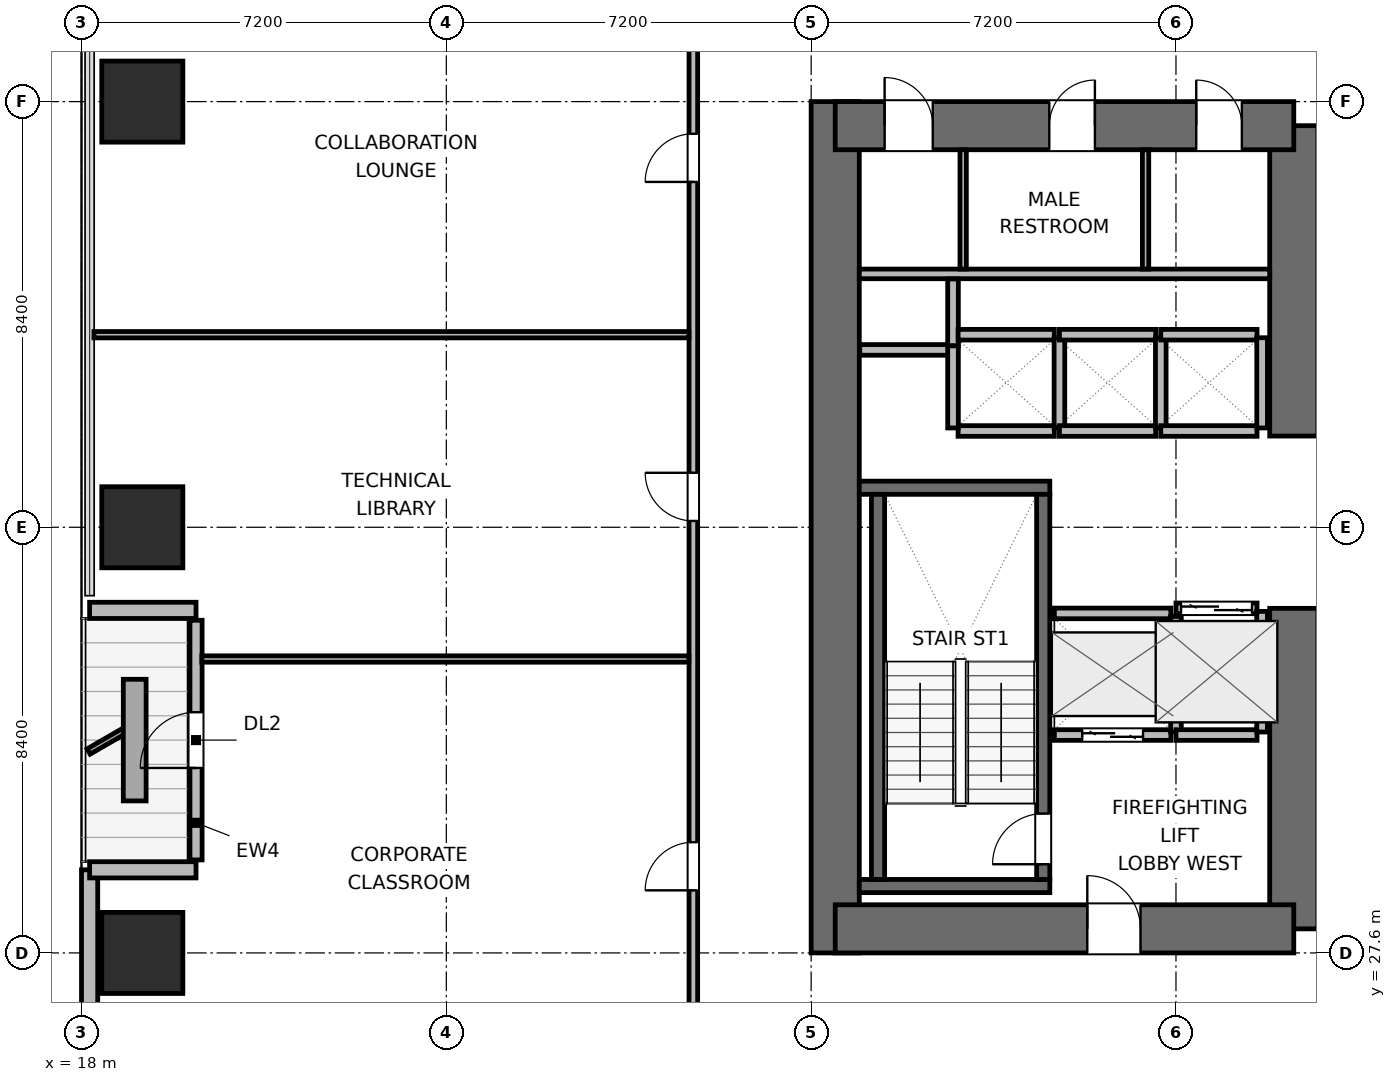
"""IFC4 building model, lengths in metres.
Left out: names, types, materials, properties, quantities, classifications, styles, units other than length and angle.
Written with IfcOpenShell. Run it as: python <this file> out.ifc"""

import sys

from ifc_helpers import new_model, si_unit, direction, frame, frame_2d, origin, origin_2d, place, context, subcontext, project, spatial, rectangle, extrude, element, fill, save


model = new_model("IFC4")
c1 = context("Model", 3, precision=1e-05, world=origin(), true_north=direction((0.0, 1.0)))
c2 = subcontext(c1, "Body", "Model", "MODEL_VIEW")
j1 = project(units=[si_unit("LENGTHUNIT", "METRE"), si_unit("PLANEANGLEUNIT", "RADIAN")], contexts=[c1])
p1 = place(None, origin())
s1 = spatial("IfcSite", under=j1, at=p1, CompositionType="ELEMENT")
p2 = place(p1, origin())
s2 = spatial("IfcBuilding", under=s1, at=p2, CompositionType="ELEMENT")
p3 = place(p2, frame((0.0, 0.0, 41.1)))
s3 = spatial("IfcBuildingStorey", under=s2, at=p3, CompositionType="ELEMENT", Elevation=41.1)
p4 = place(p3, frame((32.875, 27.6, 0.0), z_axis=(0.0, 0.0, 1.0), x_axis=(0.0, 1.0, 0.0)))
e1 = element("IfcWall", 1, at=p4, inside=s3, PredefinedType="SHEAR", context=c2, shape_type="SweptSolid", body=[
    extrude(rectangle(XDim=16.8, YDim=0.95, at=frame_2d((8.4, 0.0))), origin(), (0.0, 0.0, 1.0), 3.9),
])
p5 = place(p3, frame((41.925, 28.075, 0.0), z_axis=(0.0, 0.0, 1.0), x_axis=(0.0, 1.0, 0.0)))
e2 = element("IfcWall", 2, at=p5, inside=s3, PredefinedType="SHEAR", context=c2, shape_type="SweptSolid", body=[
    extrude(rectangle(XDim=6.325, YDim=0.95, at=frame_2d((3.163, 0.0))), origin(), (0.0, 0.0, 1.0), 3.9),
])
p6 = place(p3, frame((41.925, 37.8, 0.0), z_axis=(0.0, 0.0, 1.0), x_axis=(0.0, 1.0, 0.0)))
e3 = element("IfcWall", 3, at=p6, inside=s3, PredefinedType="SHEAR", context=c2, shape_type="SweptSolid", body=[
    extrude(rectangle(XDim=6.125, YDim=0.95, at=frame_2d((3.062, 0.0))), origin(), (0.0, 0.0, 1.0), 3.9),
])
p7 = place(p3, frame((32.875, 28.075, 0.0), z_axis=(0.0, 0.0, 1.0), x_axis=(1.0, 0.0, 0.0)))
e4 = element("IfcWall", 4, at=p7, inside=s3, PredefinedType="SHEAR", context=c2, shape_type="SweptSolid", body=[
    extrude(rectangle(XDim=9.05, YDim=0.95, at=frame_2d((4.525, 0.0))), origin(), (0.0, 0.0, 1.0), 3.9),
])
p8 = place(p7, frame((4.975, 0.0, 0.0)))
e5 = element("IfcOpeningElement", 5, at=p8, cuts=e4, PredefinedType="OPENING", context=c2, shape_type="SweptSolid", body=[
    extrude(rectangle(XDim=1.05, YDim=2.04, at=frame_2d((0.525, 1.02))), frame((0.0, 0.485, 0.0), z_axis=(0.0, -1.0, 0.0), x_axis=(1.0, 0.0, 0.0)), (0.0, 0.0, 1.0), 0.97),
])
p9 = place(p3, frame((32.875, 43.925, 0.0), z_axis=(0.0, 0.0, 1.0), x_axis=(1.0, 0.0, 0.0)))
e6 = element("IfcWall", 6, at=p9, inside=s3, PredefinedType="SHEAR", context=c2, shape_type="SweptSolid", body=[
    extrude(rectangle(XDim=9.05, YDim=0.95, at=frame_2d((4.525, 0.0))), origin(), (0.0, 0.0, 1.0), 3.9),
])
p10 = place(p9, frame((0.975, 0.0, 0.0)))
e7 = element("IfcOpeningElement", 7, at=p10, cuts=e6, PredefinedType="OPENING", context=c2, shape_type="SweptSolid", body=[
    extrude(rectangle(XDim=0.95, YDim=2.04, at=frame_2d((0.475, 1.02))), frame((0.0, 0.485, 0.0), z_axis=(0.0, -1.0, 0.0), x_axis=(1.0, 0.0, 0.0)), (0.0, 0.0, 1.0), 0.97),
])
p11 = place(p9, frame((4.225, 0.0, 0.0)))
e8 = element("IfcOpeningElement", 8, at=p11, cuts=e6, PredefinedType="OPENING", context=c2, shape_type="SweptSolid", body=[
    extrude(rectangle(XDim=0.9, YDim=2.02, at=frame_2d((0.45, 1.01))), frame((0.0, 0.485, 0.0), z_axis=(0.0, -1.0, 0.0), x_axis=(1.0, 0.0, 0.0)), (0.0, 0.0, 1.0), 0.97),
])
p12 = place(p9, frame((7.125, 0.0, 0.0)))
e9 = element("IfcOpeningElement", 9, at=p12, cuts=e6, PredefinedType="OPENING", context=c2, shape_type="SweptSolid", body=[
    extrude(rectangle(XDim=0.9, YDim=2.02, at=frame_2d((0.45, 1.01))), frame((0.0, 0.485, 0.0), z_axis=(0.0, -1.0, 0.0), x_axis=(1.0, 0.0, 0.0)), (0.0, 0.0, 1.0), 0.97),
])
for number, where, z_axis, x_axis in (
    (10, (33.35, 28.92, 0.0), (0.0, 0.0, 1.0), (1.0, 0.0, 0.0)),
    (11, (33.35, 36.78, 0.0), (0.0, 0.0, 1.0), (1.0, 0.0, 0.0)),
):
    element("IfcWall", number, at=place(p3, frame(where, z_axis=z_axis, x_axis=x_axis)), inside=s3, PredefinedType="SHEAR", context=c2, shape_type="SweptSolid", body=[
        extrude(rectangle(XDim=3.76, YDim=0.26, at=frame_2d((1.88, 0.0))), origin(), (0.0, 0.0, 1.0), 3.9),
    ])
p13 = place(p3, frame((33.72, 29.05, 0.0), z_axis=(0.0, 0.0, 1.0), x_axis=(0.0, 1.0, 0.0)))
e12 = element("IfcWall", 12, at=p13, inside=s3, PredefinedType="SHEAR", context=c2, shape_type="SweptSolid", body=[
    extrude(rectangle(XDim=7.6, YDim=0.26, at=frame_2d((3.8, 0.0))), origin(), (0.0, 0.0, 1.0), 3.9),
])
p14 = place(p3, frame((36.98, 29.05, 0.0), z_axis=(0.0, 0.0, 1.0), x_axis=(0.0, 1.0, 0.0)))
e13 = element("IfcWall", 13, at=p14, inside=s3, PredefinedType="SHEAR", context=c2, shape_type="SweptSolid", body=[
    extrude(rectangle(XDim=7.6, YDim=0.26, at=frame_2d((3.8, 0.0))), origin(), (0.0, 0.0, 1.0), 3.9),
])
p15 = place(p14, frame((0.3, 0.0, 0.0)))
e14 = element("IfcOpeningElement", 14, at=p15, cuts=e13, PredefinedType="OPENING", context=c2, shape_type="SweptSolid", body=[
    extrude(rectangle(XDim=1.0, YDim=2.04, at=frame_2d((0.5, 1.02))), frame((0.0, 0.14, 0.0), z_axis=(0.0, -1.0, 0.0), x_axis=(1.0, 0.0, 0.0)), (0.0, 0.0, 1.0), 0.28),
])
for number, where, z_axis, x_axis in (
    (15, (19.2, 27.6, 0.0), (0.0, 0.0, 1.0), (1.0, 0.0, 0.0)),
    (16, (19.2, 36.0, 0.0), (0.0, 0.0, 1.0), (1.0, 0.0, 0.0)),
    (17, (19.2, 44.4, 0.0), (0.0, 0.0, 1.0), (1.0, 0.0, 0.0)),
):
    element("IfcColumn", number, at=place(p3, frame(where, z_axis=z_axis, x_axis=x_axis)), inside=s3, PredefinedType="COLUMN", context=c2, shape_type="SweptSolid", body=[
        extrude(rectangle(XDim=1.6, YDim=1.6, at=origin_2d()), origin(), (0.0, 0.0, 1.0), 3.9),
    ])
p16 = place(p3, frame((18.16, 15.021, 0.0), z_axis=(0.0, 0.0, 1.0), x_axis=(0.0, 1.0, 0.0)))
e18 = element("IfcWall", 18, at=p16, inside=s3, PredefinedType="SOLIDWALL", context=c2, shape_type="SweptSolid", body=[
    extrude(rectangle(XDim=14.219, YDim=0.32, at=frame_2d((7.109, 0.0))), origin(), (0.0, 0.0, 1.0), 3.64),
])
p17 = place(p3, frame((18.16, 29.24, 0.0), z_axis=(0.0, 0.0, 1.0), x_axis=(1.0, 0.0, 0.0)))
e19 = element("IfcWall", 19, at=p17, inside=s3, PredefinedType="SOLIDWALL", context=c2, shape_type="SweptSolid", body=[
    extrude(rectangle(XDim=2.1, YDim=0.32, at=frame_2d((1.05, 0.0))), origin(), (0.0, 0.0, 1.0), 2.875),
])
p18 = place(p3, frame((20.26, 29.435, 0.0), z_axis=(0.0, 0.0, 1.0), x_axis=(0.0, 1.0, 0.0)))
e20 = element("IfcWall", 20, at=p18, inside=s3, PredefinedType="SOLIDWALL", context=c2, shape_type="SweptSolid", body=[
    extrude(rectangle(XDim=4.73, YDim=0.24, at=frame_2d((2.365, 0.0))), origin(), (0.0, 0.0, 1.0), 3.162),
])
p19 = place(p18, frame((1.815, 0.0, 0.0)))
e21 = element("IfcOpeningElement", 21, at=p19, cuts=e20, PredefinedType="OPENING", context=c2, shape_type="SweptSolid", body=[
    extrude(rectangle(XDim=1.1, YDim=2.04, at=frame_2d((0.55, 1.02))), frame((0.0, 0.13, 0.0), z_axis=(0.0, -1.0, 0.0), x_axis=(1.0, 0.0, 0.0)), (0.0, 0.0, 1.0), 0.26),
])
p20 = place(p3, frame((20.26, 34.36, 0.0), z_axis=(0.0, 0.0, 1.0), x_axis=(-1.0, 0.0, 0.0)))
e22 = element("IfcWall", 22, at=p20, inside=s3, PredefinedType="SOLIDWALL", context=c2, shape_type="SweptSolid", body=[
    extrude(rectangle(XDim=2.1, YDim=0.32, at=frame_2d((1.05, 0.0))), origin(), (0.0, 0.0, 1.0), 2.875),
])
p21 = place(p3, frame((33.35, 41.0, 0.0), z_axis=(0.0, 0.0, 1.0), x_axis=(1.0, 0.0, 0.0)))
e23 = element("IfcWall", 23, at=p21, inside=s3, PredefinedType="PLUMBINGWALL", context=c2, shape_type="SweptSolid", body=[
    extrude(rectangle(XDim=8.1, YDim=0.19, at=frame_2d((4.05, 0.0))), origin(), (0.0, 0.0, 1.0), 3.64),
])
for number, where, z_axis, x_axis in (
    (24, (35.4, 41.095, 0.0), (0.0, 0.0, 1.0), (0.0, 1.0, 0.0)),
    (25, (39.0, 41.095, 0.0), (0.0, 0.0, 1.0), (0.0, 1.0, 0.0)),
):
    element("IfcWall", number, at=place(p3, frame(where, z_axis=z_axis, x_axis=x_axis)), inside=s3, PredefinedType="PARTITIONING", context=c2, shape_type="SweptSolid", body=[
        extrude(rectangle(XDim=2.355, YDim=0.125, at=frame_2d((1.177, 0.0))), origin(), (0.0, 0.0, 1.0), 3.64),
    ])
p22 = place(p3, frame((33.36, 39.5, 0.0), z_axis=(0.0, 0.0, 1.0), x_axis=(1.0, 0.0, 0.0)))
e26 = element("IfcWall", 26, at=p22, inside=s3, PredefinedType="PARTITIONING", context=c2, shape_type="SweptSolid", body=[
    extrude(rectangle(XDim=1.86, YDim=0.21, at=frame_2d((0.93, 0.0))), origin(), (0.0, 0.0, 1.0), 3.64),
])
p23 = place(p3, frame((35.2, 39.58, 0.0), z_axis=(0.0, 0.0, 1.0), x_axis=(0.0, 1.0, 0.0)))
e27 = element("IfcWall", 27, at=p23, inside=s3, PredefinedType="PARTITIONING", context=c2, shape_type="SweptSolid", body=[
    extrude(rectangle(XDim=1.32, YDim=0.21, at=frame_2d((0.66, 0.0))), origin(), (0.0, 0.0, 1.0), 3.64),
])
p24 = place(p3, frame((37.2, 31.9, 0.0), z_axis=(0.0, 0.0, 1.0), x_axis=(1.0, 0.0, 0.0)))
e28 = element("IfcWall", 28, at=p24, inside=s3, PredefinedType="PARTITIONING", context=c2, shape_type="SweptSolid", body=[
    extrude(rectangle(XDim=2.3, YDim=0.21, at=frame_2d((1.15, 0.0))), origin(), (0.0, 0.0, 1.0), 3.64),
])
p25 = place(p24, frame((0.55, 0.0, 0.0)))
e29 = element("IfcOpeningElement", 29, at=p25, cuts=e28, PredefinedType="OPENING", context=c2, shape_type="SweptSolid", body=[
    extrude(rectangle(XDim=1.2, YDim=2.04, at=frame_2d((0.6, 1.02))), frame((0.0, 0.115, 0.0), z_axis=(0.0, -1.0, 0.0), x_axis=(1.0, 0.0, 0.0)), (0.0, 0.0, 1.0), 0.23),
])
p26 = place(p3, frame((37.2, 34.3, 0.0), z_axis=(0.0, 0.0, 1.0), x_axis=(1.0, 0.0, 0.0)))
e30 = element("IfcWall", 30, at=p26, inside=s3, PredefinedType="PARTITIONING", context=c2, shape_type="SweptSolid", body=[
    extrude(rectangle(XDim=2.3, YDim=0.21, at=frame_2d((1.15, 0.0))), origin(), (0.0, 0.0, 1.0), 3.64),
])
p27 = place(p3, frame((39.6, 31.96, 0.0), z_axis=(0.0, 0.0, 1.0), x_axis=(0.0, 1.0, 0.0)))
e31 = element("IfcWall", 31, at=p27, inside=s3, PredefinedType="PARTITIONING", context=c2, shape_type="SweptSolid", body=[
    extrude(rectangle(XDim=2.28, YDim=0.21, at=frame_2d((1.14, 0.0))), origin(), (0.0, 0.0, 1.0), 3.64),
])
p28 = place(p3, frame((39.6, 34.4, 0.0), z_axis=(0.0, 0.0, 1.0), x_axis=(1.0, 0.0, 0.0)))
e32 = element("IfcWall", 32, at=p28, inside=s3, PredefinedType="PARTITIONING", context=c2, shape_type="SweptSolid", body=[
    extrude(rectangle(XDim=1.6, YDim=0.21, at=frame_2d((0.8, 0.0))), origin(), (0.0, 0.0, 1.0), 3.64),
])
p29 = place(p28, frame((0.1, 0.0, 0.0)))
e33 = element("IfcOpeningElement", 33, at=p29, cuts=e32, PredefinedType="OPENING", context=c2, shape_type="SweptSolid", body=[
    extrude(rectangle(XDim=1.4, YDim=2.06, at=frame_2d((0.7, 1.03))), frame((0.0, 0.115, 0.0), z_axis=(0.0, -1.0, 0.0), x_axis=(1.0, 0.0, 0.0)), (0.0, 0.0, 1.0), 0.23),
])
p30 = place(p3, frame((39.6, 31.9, 0.0), z_axis=(0.0, 0.0, 1.0), x_axis=(1.0, 0.0, 0.0)))
e34 = element("IfcWall", 34, at=p30, inside=s3, PredefinedType="PARTITIONING", context=c2, shape_type="SweptSolid", body=[
    extrude(rectangle(XDim=1.6, YDim=0.21, at=frame_2d((0.8, 0.0))), origin(), (0.0, 0.0, 1.0), 3.64),
])
p31 = place(p3, frame((41.3, 31.96, 0.0), z_axis=(0.0, 0.0, 1.0), x_axis=(0.0, 1.0, 0.0)))
e35 = element("IfcWall", 35, at=p31, inside=s3, PredefinedType="PARTITIONING", context=c2, shape_type="SweptSolid", body=[
    extrude(rectangle(XDim=2.38, YDim=0.21, at=frame_2d((1.19, 0.0))), origin(), (0.0, 0.0, 1.0), 3.64),
])
for number, where, z_axis, x_axis in (
    (36, (35.3, 37.9, 0.0), (0.0, 0.0, 1.0), (1.0, 0.0, 0.0)),
    (37, (35.3, 39.8, 0.0), (0.0, 0.0, 1.0), (1.0, 0.0, 0.0)),
):
    element("IfcWall", number, at=place(p3, frame(where, z_axis=z_axis, x_axis=x_axis)), inside=s3, PredefinedType="PARTITIONING", context=c2, shape_type="SweptSolid", body=[
        extrude(rectangle(XDim=1.9, YDim=0.21, at=frame_2d((0.95, 0.0))), origin(), (0.0, 0.0, 1.0), 3.64),
    ])
p32 = place(p3, frame((35.2, 37.96, 0.0), z_axis=(0.0, 0.0, 1.0), x_axis=(0.0, 1.0, 0.0)))
e38 = element("IfcWall", 38, at=p32, inside=s3, PredefinedType="PARTITIONING", context=c2, shape_type="SweptSolid", body=[
    extrude(rectangle(XDim=1.62, YDim=0.21, at=frame_2d((0.81, 0.0))), origin(), (0.0, 0.0, 1.0), 3.64),
])
p33 = place(p3, frame((37.3, 37.96, 0.0), z_axis=(0.0, 0.0, 1.0), x_axis=(0.0, 1.0, 0.0)))
e39 = element("IfcWall", 39, at=p33, inside=s3, PredefinedType="PARTITIONING", context=c2, shape_type="SweptSolid", body=[
    extrude(rectangle(XDim=1.78, YDim=0.21, at=frame_2d((0.89, 0.0))), origin(), (0.0, 0.0, 1.0), 3.64),
])
for number, where, z_axis, x_axis in (
    (40, (37.3, 37.9, 0.0), (0.0, 0.0, 1.0), (1.0, 0.0, 0.0)),
    (41, (37.3, 39.8, 0.0), (0.0, 0.0, 1.0), (1.0, 0.0, 0.0)),
):
    element("IfcWall", number, at=place(p3, frame(where, z_axis=z_axis, x_axis=x_axis)), inside=s3, PredefinedType="PARTITIONING", context=c2, shape_type="SweptSolid", body=[
        extrude(rectangle(XDim=1.9, YDim=0.21, at=frame_2d((0.95, 0.0))), origin(), (0.0, 0.0, 1.0), 3.64),
    ])
p34 = place(p3, frame((39.3, 37.96, 0.0), z_axis=(0.0, 0.0, 1.0), x_axis=(0.0, 1.0, 0.0)))
e42 = element("IfcWall", 42, at=p34, inside=s3, PredefinedType="PARTITIONING", context=c2, shape_type="SweptSolid", body=[
    extrude(rectangle(XDim=1.78, YDim=0.21, at=frame_2d((0.89, 0.0))), origin(), (0.0, 0.0, 1.0), 3.64),
])
for number, where, z_axis, x_axis in (
    (43, (39.3, 37.9, 0.0), (0.0, 0.0, 1.0), (1.0, 0.0, 0.0)),
    (44, (39.3, 39.8, 0.0), (0.0, 0.0, 1.0), (1.0, 0.0, 0.0)),
):
    element("IfcWall", number, at=place(p3, frame(where, z_axis=z_axis, x_axis=x_axis)), inside=s3, PredefinedType="PARTITIONING", context=c2, shape_type="SweptSolid", body=[
        extrude(rectangle(XDim=1.9, YDim=0.21, at=frame_2d((0.95, 0.0))), origin(), (0.0, 0.0, 1.0), 3.64),
    ])
p35 = place(p3, frame((41.3, 37.96, 0.0), z_axis=(0.0, 0.0, 1.0), x_axis=(0.0, 1.0, 0.0)))
e45 = element("IfcWall", 45, at=p35, inside=s3, PredefinedType="PARTITIONING", context=c2, shape_type="SweptSolid", body=[
    extrude(rectangle(XDim=1.78, YDim=0.21, at=frame_2d((0.89, 0.0))), origin(), (0.0, 0.0, 1.0), 3.64),
])
p36 = place(p3, frame((30.075, 25.307, 0.0), z_axis=(0.0, 0.0, 1.0), x_axis=(0.0, 1.0, 0.0)))
e46 = element("IfcWall", 46, at=p36, inside=s3, PredefinedType="PARTITIONING", context=c2, shape_type="SweptSolid", body=[
    extrude(rectangle(XDim=21.386, YDim=0.17, at=frame_2d((10.693, 0.0))), origin(), (0.0, 0.0, 1.0), 3.64),
])
p37 = place(p36, frame((3.528, 0.0, 0.0)))
e47 = element("IfcOpeningElement", 47, at=p37, cuts=e46, PredefinedType="OPENING", context=c2, shape_type="SweptSolid", body=[
    extrude(rectangle(XDim=0.95, YDim=2.04, at=frame_2d((0.475, 1.02))), frame((0.0, 0.095, 0.0), z_axis=(0.0, -1.0, 0.0), x_axis=(1.0, 0.0, 0.0)), (0.0, 0.0, 1.0), 0.19),
])
p38 = place(p36, frame((10.818, 0.0, 0.0)))
e48 = element("IfcOpeningElement", 48, at=p38, cuts=e46, PredefinedType="OPENING", context=c2, shape_type="SweptSolid", body=[
    extrude(rectangle(XDim=0.95, YDim=2.04, at=frame_2d((0.475, 1.02))), frame((0.0, 0.095, 0.0), z_axis=(0.0, -1.0, 0.0), x_axis=(1.0, 0.0, 0.0)), (0.0, 0.0, 1.0), 0.19),
])
p39 = place(p36, frame((17.508, 0.0, 0.0)))
e49 = element("IfcOpeningElement", 49, at=p39, cuts=e46, PredefinedType="OPENING", context=c2, shape_type="SweptSolid", body=[
    extrude(rectangle(XDim=0.95, YDim=2.04, at=frame_2d((0.475, 1.02))), frame((0.0, 0.095, 0.0), z_axis=(0.0, -1.0, 0.0), x_axis=(1.0, 0.0, 0.0)), (0.0, 0.0, 1.0), 0.19),
])
p40 = place(p3, frame((20.375, 33.4, 0.0), z_axis=(0.0, 0.0, 1.0), x_axis=(1.0, 0.0, 0.0)))
e50 = element("IfcWall", 50, at=p40, inside=s3, PredefinedType="PARTITIONING", context=c2, shape_type="SweptSolid", body=[
    extrude(rectangle(XDim=9.613, YDim=0.125, at=frame_2d((4.807, 0.0))), origin(), (0.0, 0.0, 1.0), 3.64),
])
p41 = place(p3, frame((18.245, 39.8, 0.0), z_axis=(0.0, 0.0, 1.0), x_axis=(1.0, 0.0, 0.0)))
e51 = element("IfcWall", 51, at=p41, inside=s3, PredefinedType="PARTITIONING", context=c2, shape_type="SweptSolid", body=[
    extrude(rectangle(XDim=11.743, YDim=0.125, at=frame_2d((5.872, 0.0))), origin(), (0.0, 0.0, 1.0), 3.64),
])
p42 = place(p19, origin())
e52 = element("IfcDoor", 52, at=p42, inside=s3, OperationType="SINGLE_SWING_LEFT", PredefinedType="DOOR", context=c2, shape_type="SweptSolid", body=[
    extrude(rectangle(XDim=1.1, YDim=2.04, at=frame_2d((0.55, 1.02))), frame((0.0, 0.025, 0.0), z_axis=(0.0, -1.0, 0.0), x_axis=(1.0, 0.0, 0.0)), (0.0, 0.0, 1.0), 0.05),
])
fill(e21, e52)
p43 = place(p15, origin())
e53 = element("IfcDoor", 53, at=p43, inside=s3, OperationType="SINGLE_SWING_LEFT", PredefinedType="DOOR", context=c2, shape_type="SweptSolid", body=[
    extrude(rectangle(XDim=1.0, YDim=2.04, at=frame_2d((0.5, 1.02))), frame((0.0, 0.025, 0.0), z_axis=(0.0, -1.0, 0.0), x_axis=(1.0, 0.0, 0.0)), (0.0, 0.0, 1.0), 0.05),
])
fill(e14, e53)
p44 = place(p25, origin())
e54 = element("IfcDoor", 54, at=p44, inside=s3, OperationType="DOUBLE_DOOR_SLIDING", PredefinedType="DOOR", context=c2, shape_type="SweptSolid", body=[
    extrude(rectangle(XDim=1.2, YDim=2.04, at=frame_2d((0.6, 1.02))), frame((0.0, 0.025, 0.0), z_axis=(0.0, -1.0, 0.0), x_axis=(1.0, 0.0, 0.0)), (0.0, 0.0, 1.0), 0.05),
])
fill(e29, e54)
p45 = place(p29, origin())
e55 = element("IfcDoor", 55, at=p45, inside=s3, OperationType="DOUBLE_DOOR_SLIDING", PredefinedType="DOOR", context=c2, shape_type="SweptSolid", body=[
    extrude(rectangle(XDim=1.4, YDim=2.06, at=frame_2d((0.7, 1.03))), frame((0.0, 0.025, 0.0), z_axis=(0.0, -1.0, 0.0), x_axis=(1.0, 0.0, 0.0)), (0.0, 0.0, 1.0), 0.05),
])
fill(e33, e55)
p46 = place(p8, origin())
e56 = element("IfcDoor", 56, at=p46, inside=s3, OperationType="SINGLE_SWING_LEFT", PredefinedType="DOOR", context=c2, shape_type="SweptSolid", body=[
    extrude(rectangle(XDim=1.05, YDim=2.04, at=frame_2d((0.525, 1.02))), frame((0.0, 0.025, 0.0), z_axis=(0.0, -1.0, 0.0), x_axis=(1.0, 0.0, 0.0)), (0.0, 0.0, 1.0), 0.05),
])
fill(e5, e56)
p47 = place(p10, origin())
e57 = element("IfcDoor", 57, at=p47, inside=s3, OperationType="SINGLE_SWING_LEFT", PredefinedType="DOOR", context=c2, shape_type="SweptSolid", body=[
    extrude(rectangle(XDim=0.95, YDim=2.04, at=frame_2d((0.475, 1.02))), frame((0.0, 0.025, 0.0), z_axis=(0.0, -1.0, 0.0), x_axis=(1.0, 0.0, 0.0)), (0.0, 0.0, 1.0), 0.05),
])
fill(e7, e57)
p48 = place(p11, origin())
e58 = element("IfcDoor", 58, at=p48, inside=s3, OperationType="SINGLE_SWING_RIGHT", PredefinedType="DOOR", context=c2, shape_type="SweptSolid", body=[
    extrude(rectangle(XDim=0.9, YDim=2.02, at=frame_2d((0.45, 1.01))), frame((0.0, 0.025, 0.0), z_axis=(0.0, -1.0, 0.0), x_axis=(1.0, 0.0, 0.0)), (0.0, 0.0, 1.0), 0.05),
])
fill(e8, e58)
p49 = place(p12, origin())
e59 = element("IfcDoor", 59, at=p49, inside=s3, OperationType="SINGLE_SWING_LEFT", PredefinedType="DOOR", context=c2, shape_type="SweptSolid", body=[
    extrude(rectangle(XDim=0.9, YDim=2.02, at=frame_2d((0.45, 1.01))), frame((0.0, 0.025, 0.0), z_axis=(0.0, -1.0, 0.0), x_axis=(1.0, 0.0, 0.0)), (0.0, 0.0, 1.0), 0.05),
])
fill(e9, e59)
p50 = place(p37, origin())
e60 = element("IfcDoor", 60, at=p50, inside=s3, OperationType="SINGLE_SWING_LEFT", PredefinedType="DOOR", context=c2, shape_type="SweptSolid", body=[
    extrude(rectangle(XDim=0.95, YDim=2.04, at=frame_2d((0.475, 1.02))), frame((0.0, 0.025, 0.0), z_axis=(0.0, -1.0, 0.0), x_axis=(1.0, 0.0, 0.0)), (0.0, 0.0, 1.0), 0.05),
])
fill(e47, e60)
p51 = place(p38, origin())
e61 = element("IfcDoor", 61, at=p51, inside=s3, OperationType="SINGLE_SWING_RIGHT", PredefinedType="DOOR", context=c2, shape_type="SweptSolid", body=[
    extrude(rectangle(XDim=0.95, YDim=2.04, at=frame_2d((0.475, 1.02))), frame((0.0, 0.025, 0.0), z_axis=(0.0, -1.0, 0.0), x_axis=(1.0, 0.0, 0.0)), (0.0, 0.0, 1.0), 0.05),
])
fill(e48, e61)
p52 = place(p39, origin())
e62 = element("IfcDoor", 62, at=p52, inside=s3, OperationType="SINGLE_SWING_LEFT", PredefinedType="DOOR", context=c2, shape_type="SweptSolid", body=[
    extrude(rectangle(XDim=0.95, YDim=2.04, at=frame_2d((0.475, 1.02))), frame((0.0, 0.025, 0.0), z_axis=(0.0, -1.0, 0.0), x_axis=(1.0, 0.0, 0.0)), (0.0, 0.0, 1.0), 0.05),
])
fill(e49, e62)
save(model, sys.argv[1])
